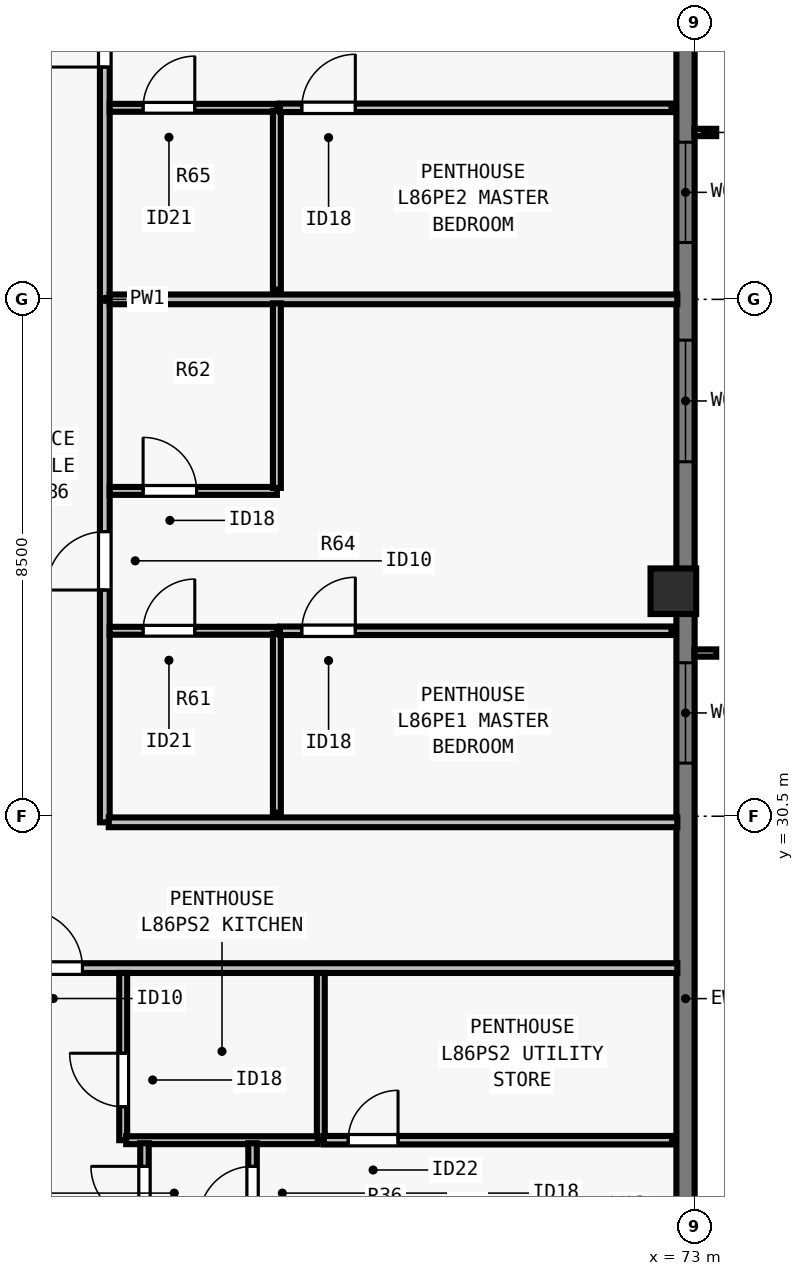
"""IFC4 building model, lengths in metres.
Left out: names, types, materials, properties, quantities, classifications, styles, units other than length and angle.
Written with IfcOpenShell. Run it as: python <this file> out.ifc"""

import sys

from ifc_helpers import new_model, si_unit, direction, frame, frame_2d, origin, origin_2d, place, context, subcontext, project, spatial, rectangle, extrude, element, fill, save


model = new_model("IFC4")
c1 = context("Model", 3, precision=1e-05, world=origin(), true_north=direction((0.0, 1.0)))
c2 = subcontext(c1, "Body", "Model", "MODEL_VIEW")
j1 = project(units=[si_unit("LENGTHUNIT", "METRE"), si_unit("PLANEANGLEUNIT", "RADIAN")], contexts=[c1])
p1 = place(None, origin())
s1 = spatial("IfcSite", under=j1, at=p1, CompositionType="ELEMENT")
p2 = place(p1, origin())
s2 = spatial("IfcBuilding", under=s1, at=p2, CompositionType="ELEMENT")
p3 = place(p2, frame((0.0, 0.0, 312.0)))
s3 = spatial("IfcBuildingStorey", under=s2, at=p3, CompositionType="ELEMENT", Elevation=312.0)
p4 = place(p3, frame((72.65, 34.2, 0.0), z_axis=(0.0, 0.0, 1.0), x_axis=(0.0, 1.0, 0.0)))
e1 = element("IfcColumn", 1, at=p4, inside=s3, PredefinedType="COLUMN", context=c2, shape_type="SweptSolid", body=[
    extrude(rectangle(XDim=0.75, YDim=0.75, at=origin_2d()), origin(), (0.0, 0.0, 1.0), 3.5),
])
p5 = place(p3, frame((72.85, 44.4, 0.0), z_axis=(0.0, 0.0, 1.0), x_axis=(0.0, -1.0, 0.0)))
e2 = element("IfcWall", 2, at=p5, inside=s3, PredefinedType="SOLIDWALL", context=c2, shape_type="SweptSolid", body=[
    extrude(rectangle(XDim=20.622, YDim=0.3, at=frame_2d((10.311, 0.0))), origin(), (0.0, 0.0, 1.0), 3.29),
])
p6 = place(p5, frame((2.815, 0.0, 0.8)))
e3 = element("IfcOpeningElement", 3, at=p6, cuts=e2, PredefinedType="OPENING", context=c2, shape_type="SweptSolid", body=[
    extrude(rectangle(XDim=1.65, YDim=1.758, at=frame_2d((0.825, 0.879))), frame((0.0, 0.16, 0.0), z_axis=(0.0, -1.0, 0.0), x_axis=(1.0, 0.0, 0.0)), (0.0, 0.0, 1.0), 0.32),
])
p7 = place(p5, frame((6.071, 0.0, 0.8)))
e4 = element("IfcOpeningElement", 4, at=p7, cuts=e2, PredefinedType="OPENING", context=c2, shape_type="SweptSolid", body=[
    extrude(rectangle(XDim=2.0, YDim=1.758, at=frame_2d((1.0, 0.879))), frame((0.0, 0.16, 0.0), z_axis=(0.0, -1.0, 0.0), x_axis=(1.0, 0.0, 0.0)), (0.0, 0.0, 1.0), 0.32),
])
p8 = place(p5, frame((11.376, 0.0, 0.8)))
e5 = element("IfcOpeningElement", 5, at=p8, cuts=e2, PredefinedType="OPENING", context=c2, shape_type="SweptSolid", body=[
    extrude(rectangle(XDim=1.65, YDim=1.758, at=frame_2d((0.825, 0.879))), frame((0.0, 0.16, 0.0), z_axis=(0.0, -1.0, 0.0), x_axis=(1.0, 0.0, 0.0)), (0.0, 0.0, 1.0), 0.32),
])
p9 = place(p3, frame((31.285, 28.002, 0.0), z_axis=(0.0, 0.0, 1.0), x_axis=(1.0, 0.0, 0.0)))
e6 = element("IfcWall", 6, at=p9, inside=s3, PredefinedType="PARTITIONING", context=c2, shape_type="SweptSolid", body=[
    extrude(rectangle(XDim=41.43, YDim=0.16, at=frame_2d((20.715, 0.0))), origin(), (0.0, 0.0, 1.0), 3.009),
])
p10 = place(p9, frame((10.107, 0.0, 0.0)))
e7 = element("IfcOpeningElement", 7, at=p10, cuts=e6, PredefinedType="OPENING", context=c2, shape_type="SweptSolid", body=[
    extrude(rectangle(XDim=0.96, YDim=2.18, at=frame_2d((0.48, 1.09))), frame((0.0, 0.09, 0.0), z_axis=(0.0, -1.0, 0.0), x_axis=(1.0, 0.0, 0.0)), (0.0, 0.0, 1.0), 0.18),
])
p11 = place(p9, frame((30.688, 0.0, 0.0)))
e8 = element("IfcOpeningElement", 8, at=p11, cuts=e6, PredefinedType="OPENING", context=c2, shape_type="SweptSolid", body=[
    extrude(rectangle(XDim=0.96, YDim=2.18, at=frame_2d((0.48, 1.09))), frame((0.0, 0.09, 0.0), z_axis=(0.0, -1.0, 0.0), x_axis=(1.0, 0.0, 0.0)), (0.0, 0.0, 1.0), 0.18),
])
p12 = place(p3, frame((63.3, 30.4, 0.0), z_axis=(0.0, 0.0, 1.0), x_axis=(0.0, 1.0, 0.0)))
e9 = element("IfcWall", 9, at=p12, inside=s3, PredefinedType="PARTITIONING", context=c2, shape_type="SweptSolid", body=[
    extrude(rectangle(XDim=17.2, YDim=0.16, at=frame_2d((8.6, 0.0))), origin(), (0.0, 0.0, 1.0), 3.29),
])
p13 = place(p12, frame((3.82, 0.0, 0.0)))
e10 = element("IfcOpeningElement", 10, at=p13, cuts=e9, PredefinedType="OPENING", context=c2, shape_type="SweptSolid", body=[
    extrude(rectangle(XDim=0.96, YDim=2.18, at=frame_2d((0.48, 1.09))), frame((0.0, 0.09, 0.0), z_axis=(0.0, -1.0, 0.0), x_axis=(1.0, 0.0, 0.0)), (0.0, 0.0, 1.0), 0.18),
])
p14 = place(p12, frame((12.42, 0.0, 0.0)))
e11 = element("IfcOpeningElement", 11, at=p14, cuts=e9, PredefinedType="OPENING", context=c2, shape_type="SweptSolid", body=[
    extrude(rectangle(XDim=0.96, YDim=2.18, at=frame_2d((0.48, 1.09))), frame((0.0, 0.09, 0.0), z_axis=(0.0, -1.0, 0.0), x_axis=(1.0, 0.0, 0.0)), (0.0, 0.0, 1.0), 0.18),
])
p15 = place(p3, frame((63.365, 30.4, 0.0), z_axis=(0.0, 0.0, 1.0), x_axis=(1.0, 0.0, 0.0)))
e12 = element("IfcWall", 12, at=p15, inside=s3, PredefinedType="PARTITIONING", context=c2, shape_type="SweptSolid", body=[
    extrude(rectangle(XDim=9.35, YDim=0.16, at=frame_2d((4.675, 0.0))), origin(), (0.0, 0.0, 1.0), 3.29),
])
p16 = place(p3, frame((66.853, 25.173, 0.0), z_axis=(0.0, 0.0, 1.0), x_axis=(0.0, 1.0, 0.0)))
e13 = element("IfcWall", 13, at=p16, inside=s3, PredefinedType="PLUMBINGWALL", context=c2, shape_type="SweptSolid", body=[
    extrude(rectangle(XDim=2.75, YDim=0.13, at=frame_2d((1.375, 0.0))), origin(), (0.0, 0.0, 1.0), 3.29),
])
p17 = place(p3, frame((63.603, 25.173, 0.0), z_axis=(0.0, 0.0, 1.0), x_axis=(0.0, 1.0, 0.0)))
e14 = element("IfcWall", 14, at=p17, inside=s3, PredefinedType="PLUMBINGWALL", context=c2, shape_type="SweptSolid", body=[
    extrude(rectangle(XDim=2.75, YDim=0.13, at=frame_2d((1.375, 0.0))), origin(), (0.0, 0.0, 1.0), 3.29),
])
p18 = place(p17, frame((0.55, 0.0, 0.0)))
e15 = element("IfcOpeningElement", 15, at=p18, cuts=e14, PredefinedType="OPENING", context=c2, shape_type="SweptSolid", body=[
    extrude(rectangle(XDim=0.88, YDim=2.1, at=frame_2d((0.44, 1.05))), frame((0.0, 0.075, 0.0), z_axis=(0.0, -1.0, 0.0), x_axis=(1.0, 0.0, 0.0)), (0.0, 0.0, 1.0), 0.15),
])
p19 = place(p3, frame((63.653, 25.173, 0.0), z_axis=(0.0, 0.0, 1.0), x_axis=(1.0, 0.0, 0.0)))
e16 = element("IfcWall", 16, at=p19, inside=s3, PredefinedType="PLUMBINGWALL", context=c2, shape_type="SweptSolid", body=[
    extrude(rectangle(XDim=3.15, YDim=0.13, at=frame_2d((1.575, 0.0))), origin(), (0.0, 0.0, 1.0), 3.29),
])
p20 = place(p3, frame((65.73, 18.38, 0.0), z_axis=(0.0, 0.0, 1.0), x_axis=(0.0, 1.0, 0.0)))
e17 = element("IfcWall", 17, at=p20, inside=s3, PredefinedType="PARTITIONING", context=c2, shape_type="SweptSolid", body=[
    extrude(rectangle(XDim=6.743, YDim=0.14, at=frame_2d((3.371, 0.0))), origin(), (0.0, 0.0, 1.0), 2.653),
])
p21 = place(p20, frame((5.482, 0.0, 0.0)))
e18 = element("IfcOpeningElement", 18, at=p21, cuts=e17, PredefinedType="OPENING", context=c2, shape_type="SweptSolid", body=[
    extrude(rectangle(XDim=0.88, YDim=2.1, at=frame_2d((0.44, 1.05))), frame((0.0, 0.08, 0.0), z_axis=(0.0, -1.0, 0.0), x_axis=(1.0, 0.0, 0.0)), (0.0, 0.0, 1.0), 0.16),
])
p22 = place(p3, frame((66.903, 25.173, 0.0), z_axis=(0.0, 0.0, 1.0), x_axis=(1.0, 0.0, 0.0)))
e19 = element("IfcWall", 19, at=p22, inside=s3, PredefinedType="PARTITIONING", context=c2, shape_type="SweptSolid", body=[
    extrude(rectangle(XDim=5.727, YDim=0.14, at=frame_2d((2.864, 0.0))), origin(), (0.0, 0.0, 1.0), 3.009),
])
p23 = place(p22, frame((0.4, 0.0, 0.0)))
e20 = element("IfcOpeningElement", 20, at=p23, cuts=e19, PredefinedType="OPENING", context=c2, shape_type="SweptSolid", body=[
    extrude(rectangle(XDim=0.82, YDim=2.1, at=frame_2d((0.41, 1.05))), frame((0.0, 0.08, 0.0), z_axis=(0.0, -1.0, 0.0), x_axis=(1.0, 0.0, 0.0)), (0.0, 0.0, 1.0), 0.16),
])
p24 = place(p3, frame((63.952, 18.38, 0.0), z_axis=(0.0, 0.0, 1.0), x_axis=(0.0, 1.0, 0.0)))
e21 = element("IfcWall", 21, at=p24, inside=s3, PredefinedType="PARTITIONING", context=c2, shape_type="SweptSolid", body=[
    extrude(rectangle(XDim=6.743, YDim=0.14, at=frame_2d((3.371, 0.0))), origin(), (0.0, 0.0, 1.0), 2.653),
])
p25 = place(p24, frame((5.482, 0.0, 0.0)))
e22 = element("IfcOpeningElement", 22, at=p25, cuts=e21, PredefinedType="OPENING", context=c2, shape_type="SweptSolid", body=[
    extrude(rectangle(XDim=0.88, YDim=2.1, at=frame_2d((0.44, 1.05))), frame((0.0, 0.08, 0.0), z_axis=(0.0, -1.0, 0.0), x_axis=(1.0, 0.0, 0.0)), (0.0, 0.0, 1.0), 0.16),
])
p26 = place(p3, frame((63.38, 39.0, 0.0), z_axis=(0.0, 0.0, 1.0), x_axis=(1.0, 0.0, 0.0)))
e23 = element("IfcWall", 23, at=p26, inside=s3, PredefinedType="PARTITIONING", context=c2, shape_type="SweptSolid", body=[
    extrude(rectangle(XDim=9.335, YDim=0.16, at=frame_2d((4.667, 0.0))), origin(), (0.0, 0.0, 1.0), 3.29),
])
p27 = place(p3, frame((63.38, 33.55, 0.0), z_axis=(0.0, 0.0, 1.0), x_axis=(1.0, 0.0, 0.0)))
e24 = element("IfcWall", 24, at=p27, inside=s3, PredefinedType="PLUMBINGWALL", context=c2, shape_type="SweptSolid", body=[
    extrude(rectangle(XDim=2.75, YDim=0.13, at=frame_2d((1.375, 0.0))), origin(), (0.0, 0.0, 1.0), 3.29),
])
p28 = place(p27, frame((0.55, 0.0, 0.0)))
e25 = element("IfcOpeningElement", 25, at=p28, cuts=e24, PredefinedType="OPENING", context=c2, shape_type="SweptSolid", body=[
    extrude(rectangle(XDim=0.85, YDim=2.08, at=frame_2d((0.425, 1.04))), frame((0.0, 0.075, 0.0), z_axis=(0.0, -1.0, 0.0), x_axis=(1.0, 0.0, 0.0)), (0.0, 0.0, 1.0), 0.15),
])
p29 = place(p3, frame((66.13, 30.56, 0.0), z_axis=(0.0, 0.0, 1.0), x_axis=(0.0, 1.0, 0.0)))
e26 = element("IfcWall", 26, at=p29, inside=s3, PredefinedType="PLUMBINGWALL", context=c2, shape_type="SweptSolid", body=[
    extrude(rectangle(XDim=2.94, YDim=0.13, at=frame_2d((1.47, 0.0))), origin(), (0.0, 0.0, 1.0), 3.29),
])
p30 = place(p3, frame((63.38, 35.85, 0.0), z_axis=(0.0, 0.0, 1.0), x_axis=(1.0, 0.0, 0.0)))
e27 = element("IfcWall", 27, at=p30, inside=s3, PredefinedType="PLUMBINGWALL", context=c2, shape_type="SweptSolid", body=[
    extrude(rectangle(XDim=2.75, YDim=0.13, at=frame_2d((1.375, 0.0))), origin(), (0.0, 0.0, 1.0), 3.29),
])
p31 = place(p30, frame((0.55, 0.0, 0.0)))
e28 = element("IfcOpeningElement", 28, at=p31, cuts=e27, PredefinedType="OPENING", context=c2, shape_type="SweptSolid", body=[
    extrude(rectangle(XDim=0.88, YDim=2.1, at=frame_2d((0.44, 1.05))), frame((0.0, 0.075, 0.0), z_axis=(0.0, -1.0, 0.0), x_axis=(1.0, 0.0, 0.0)), (0.0, 0.0, 1.0), 0.15),
])
p32 = place(p3, frame((66.13, 35.9, 0.0), z_axis=(0.0, 0.0, 1.0), x_axis=(0.0, 1.0, 0.0)))
e29 = element("IfcWall", 29, at=p32, inside=s3, PredefinedType="PLUMBINGWALL", context=c2, shape_type="SweptSolid", body=[
    extrude(rectangle(XDim=3.035, YDim=0.13, at=frame_2d((1.518, 0.0))), origin(), (0.0, 0.0, 1.0), 3.29),
])
p33 = place(p3, frame((66.18, 33.55, 0.0), z_axis=(0.0, 0.0, 1.0), x_axis=(1.0, 0.0, 0.0)))
e30 = element("IfcWall", 30, at=p33, inside=s3, PredefinedType="PARTITIONING", context=c2, shape_type="SweptSolid", body=[
    extrude(rectangle(XDim=6.44, YDim=0.14, at=frame_2d((3.22, 0.0))), origin(), (0.0, 0.0, 1.0), 2.653),
])
p34 = place(p33, frame((0.36, 0.0, 0.0)))
e31 = element("IfcOpeningElement", 31, at=p34, cuts=e30, PredefinedType="OPENING", context=c2, shape_type="SweptSolid", body=[
    extrude(rectangle(XDim=0.88, YDim=2.1, at=frame_2d((0.44, 1.05))), frame((0.0, 0.08, 0.0), z_axis=(0.0, -1.0, 0.0), x_axis=(1.0, 0.0, 0.0)), (0.0, 0.0, 1.0), 0.16),
])
p35 = place(p3, frame((63.38, 42.15, 0.0), z_axis=(0.0, 0.0, 1.0), x_axis=(1.0, 0.0, 0.0)))
e32 = element("IfcWall", 32, at=p35, inside=s3, PredefinedType="PLUMBINGWALL", context=c2, shape_type="SweptSolid", body=[
    extrude(rectangle(XDim=2.75, YDim=0.13, at=frame_2d((1.375, 0.0))), origin(), (0.0, 0.0, 1.0), 3.29),
])
p36 = place(p35, frame((0.55, 0.0, 0.0)))
e33 = element("IfcOpeningElement", 33, at=p36, cuts=e32, PredefinedType="OPENING", context=c2, shape_type="SweptSolid", body=[
    extrude(rectangle(XDim=0.85, YDim=2.08, at=frame_2d((0.425, 1.04))), frame((0.0, 0.075, 0.0), z_axis=(0.0, -1.0, 0.0), x_axis=(1.0, 0.0, 0.0)), (0.0, 0.0, 1.0), 0.15),
])
p37 = place(p3, frame((66.13, 39.16, 0.0), z_axis=(0.0, 0.0, 1.0), x_axis=(0.0, 1.0, 0.0)))
e34 = element("IfcWall", 34, at=p37, inside=s3, PredefinedType="PLUMBINGWALL", context=c2, shape_type="SweptSolid", body=[
    extrude(rectangle(XDim=2.94, YDim=0.13, at=frame_2d((1.47, 0.0))), origin(), (0.0, 0.0, 1.0), 3.29),
])
p38 = place(p3, frame((66.18, 42.15, 0.0), z_axis=(0.0, 0.0, 1.0), x_axis=(1.0, 0.0, 0.0)))
e35 = element("IfcWall", 35, at=p38, inside=s3, PredefinedType="PARTITIONING", context=c2, shape_type="SweptSolid", body=[
    extrude(rectangle(XDim=6.44, YDim=0.14, at=frame_2d((3.22, 0.0))), origin(), (0.0, 0.0, 1.0), 3.29),
])
p39 = place(p38, frame((0.36, 0.0, 0.0)))
e36 = element("IfcOpeningElement", 36, at=p39, cuts=e35, PredefinedType="OPENING", context=c2, shape_type="SweptSolid", body=[
    extrude(rectangle(XDim=0.88, YDim=2.1, at=frame_2d((0.44, 1.05))), frame((0.0, 0.08, 0.0), z_axis=(0.0, -1.0, 0.0), x_axis=(1.0, 0.0, 0.0)), (0.0, 0.0, 1.0), 0.16),
])
p40 = place(p6, origin())
e37 = element("IfcWindow", 37, at=p40, inside=s3, PartitioningType="SINGLE_PANEL", PredefinedType="WINDOW", context=c2, shape_type="SweptSolid", body=[
    extrude(rectangle(XDim=1.65, YDim=1.758, at=frame_2d((0.825, 0.879))), frame((0.0, -0.05, 0.0), z_axis=(0.0, -1.0, 0.0), x_axis=(1.0, 0.0, 0.0)), (0.0, 0.0, 1.0), 0.06),
])
fill(e3, e37)
p41 = place(p7, origin())
e38 = element("IfcWindow", 38, at=p41, inside=s3, PartitioningType="SINGLE_PANEL", PredefinedType="WINDOW", context=c2, shape_type="SweptSolid", body=[
    extrude(rectangle(XDim=2.0, YDim=1.758, at=frame_2d((1.0, 0.879))), frame((0.0, -0.05, 0.0), z_axis=(0.0, -1.0, 0.0), x_axis=(1.0, 0.0, 0.0)), (0.0, 0.0, 1.0), 0.06),
])
fill(e4, e38)
p42 = place(p8, origin())
e39 = element("IfcWindow", 39, at=p42, inside=s3, PartitioningType="SINGLE_PANEL", PredefinedType="WINDOW", context=c2, shape_type="SweptSolid", body=[
    extrude(rectangle(XDim=1.65, YDim=1.758, at=frame_2d((0.825, 0.879))), frame((0.0, -0.05, 0.0), z_axis=(0.0, -1.0, 0.0), x_axis=(1.0, 0.0, 0.0)), (0.0, 0.0, 1.0), 0.06),
])
fill(e5, e39)
p43 = place(p18, origin())
e40 = element("IfcDoor", 40, at=p43, inside=s3, OperationType="SINGLE_SWING_RIGHT", PredefinedType="DOOR", context=c2, shape_type="SweptSolid", body=[
    extrude(rectangle(XDim=0.88, YDim=2.1, at=frame_2d((0.44, 1.05))), frame((0.0, 0.025, 0.0), z_axis=(0.0, -1.0, 0.0), x_axis=(1.0, 0.0, 0.0)), (0.0, 0.0, 1.0), 0.05),
])
fill(e15, e40)
p44 = place(p23, origin())
e41 = element("IfcDoor", 41, at=p44, inside=s3, OperationType="SINGLE_SWING_RIGHT", PredefinedType="DOOR", context=c2, shape_type="SweptSolid", body=[
    extrude(rectangle(XDim=0.82, YDim=2.1, at=frame_2d((0.41, 1.05))), frame((0.0, 0.025, 0.0), z_axis=(0.0, -1.0, 0.0), x_axis=(1.0, 0.0, 0.0)), (0.0, 0.0, 1.0), 0.05),
])
fill(e20, e41)
p45 = place(p21, origin())
e42 = element("IfcDoor", 42, at=p45, inside=s3, OperationType="SINGLE_SWING_LEFT", PredefinedType="DOOR", context=c2, shape_type="SweptSolid", body=[
    extrude(rectangle(XDim=0.88, YDim=2.1, at=frame_2d((0.44, 1.05))), frame((0.0, 0.025, 0.0), z_axis=(0.0, -1.0, 0.0), x_axis=(1.0, 0.0, 0.0)), (0.0, 0.0, 1.0), 0.05),
])
fill(e18, e42)
p46 = place(p25, origin())
e43 = element("IfcDoor", 43, at=p46, inside=s3, OperationType="SINGLE_SWING_RIGHT", PredefinedType="DOOR", context=c2, shape_type="SweptSolid", body=[
    extrude(rectangle(XDim=0.88, YDim=2.1, at=frame_2d((0.44, 1.05))), frame((0.0, 0.025, 0.0), z_axis=(0.0, -1.0, 0.0), x_axis=(1.0, 0.0, 0.0)), (0.0, 0.0, 1.0), 0.05),
])
fill(e22, e43)
p47 = place(p11, origin())
e44 = element("IfcDoor", 44, at=p47, inside=s3, OperationType="SINGLE_SWING_LEFT", PredefinedType="DOOR", context=c2, shape_type="SweptSolid", body=[
    extrude(rectangle(XDim=0.96, YDim=2.18, at=frame_2d((0.48, 1.09))), frame((0.0, 0.025, 0.0), z_axis=(0.0, -1.0, 0.0), x_axis=(1.0, 0.0, 0.0)), (0.0, 0.0, 1.0), 0.05),
])
fill(e8, e44)
p48 = place(p28, origin())
e45 = element("IfcDoor", 45, at=p48, inside=s3, OperationType="SINGLE_SWING_RIGHT", PredefinedType="DOOR", context=c2, shape_type="SweptSolid", body=[
    extrude(rectangle(XDim=0.85, YDim=2.08, at=frame_2d((0.425, 1.04))), frame((0.0, 0.025, 0.0), z_axis=(0.0, -1.0, 0.0), x_axis=(1.0, 0.0, 0.0)), (0.0, 0.0, 1.0), 0.05),
])
fill(e25, e45)
p49 = place(p31, origin())
e46 = element("IfcDoor", 46, at=p49, inside=s3, OperationType="SINGLE_SWING_LEFT", PredefinedType="DOOR", context=c2, shape_type="SweptSolid", body=[
    extrude(rectangle(XDim=0.88, YDim=2.1, at=frame_2d((0.44, 1.05))), frame((0.0, 0.025, 0.0), z_axis=(0.0, -1.0, 0.0), x_axis=(1.0, 0.0, 0.0)), (0.0, 0.0, 1.0), 0.05),
])
fill(e28, e46)
p50 = place(p34, origin())
e47 = element("IfcDoor", 47, at=p50, inside=s3, OperationType="SINGLE_SWING_RIGHT", PredefinedType="DOOR", context=c2, shape_type="SweptSolid", body=[
    extrude(rectangle(XDim=0.88, YDim=2.1, at=frame_2d((0.44, 1.05))), frame((0.0, 0.025, 0.0), z_axis=(0.0, -1.0, 0.0), x_axis=(1.0, 0.0, 0.0)), (0.0, 0.0, 1.0), 0.05),
])
fill(e31, e47)
p51 = place(p13, origin())
e48 = element("IfcDoor", 48, at=p51, inside=s3, OperationType="SINGLE_SWING_LEFT", PredefinedType="DOOR", context=c2, shape_type="SweptSolid", body=[
    extrude(rectangle(XDim=0.96, YDim=2.18, at=frame_2d((0.48, 1.09))), frame((0.0, 0.025, 0.0), z_axis=(0.0, -1.0, 0.0), x_axis=(1.0, 0.0, 0.0)), (0.0, 0.0, 1.0), 0.05),
])
fill(e10, e48)
p52 = place(p36, origin())
e49 = element("IfcDoor", 49, at=p52, inside=s3, OperationType="SINGLE_SWING_RIGHT", PredefinedType="DOOR", context=c2, shape_type="SweptSolid", body=[
    extrude(rectangle(XDim=0.85, YDim=2.08, at=frame_2d((0.425, 1.04))), frame((0.0, 0.025, 0.0), z_axis=(0.0, -1.0, 0.0), x_axis=(1.0, 0.0, 0.0)), (0.0, 0.0, 1.0), 0.05),
])
fill(e33, e49)
p53 = place(p39, origin())
e50 = element("IfcDoor", 50, at=p53, inside=s3, OperationType="SINGLE_SWING_RIGHT", PredefinedType="DOOR", context=c2, shape_type="SweptSolid", body=[
    extrude(rectangle(XDim=0.88, YDim=2.1, at=frame_2d((0.44, 1.05))), frame((0.0, 0.025, 0.0), z_axis=(0.0, -1.0, 0.0), x_axis=(1.0, 0.0, 0.0)), (0.0, 0.0, 1.0), 0.05),
])
fill(e36, e50)
p54 = place(p14, origin())
e51 = element("IfcDoor", 51, at=p54, inside=s3, OperationType="SINGLE_SWING_LEFT", PredefinedType="DOOR", context=c2, shape_type="SweptSolid", body=[
    extrude(rectangle(XDim=0.96, YDim=2.18, at=frame_2d((0.48, 1.09))), frame((0.0, 0.025, 0.0), z_axis=(0.0, -1.0, 0.0), x_axis=(1.0, 0.0, 0.0)), (0.0, 0.0, 1.0), 0.05),
])
fill(e11, e51)
save(model, sys.argv[1])
